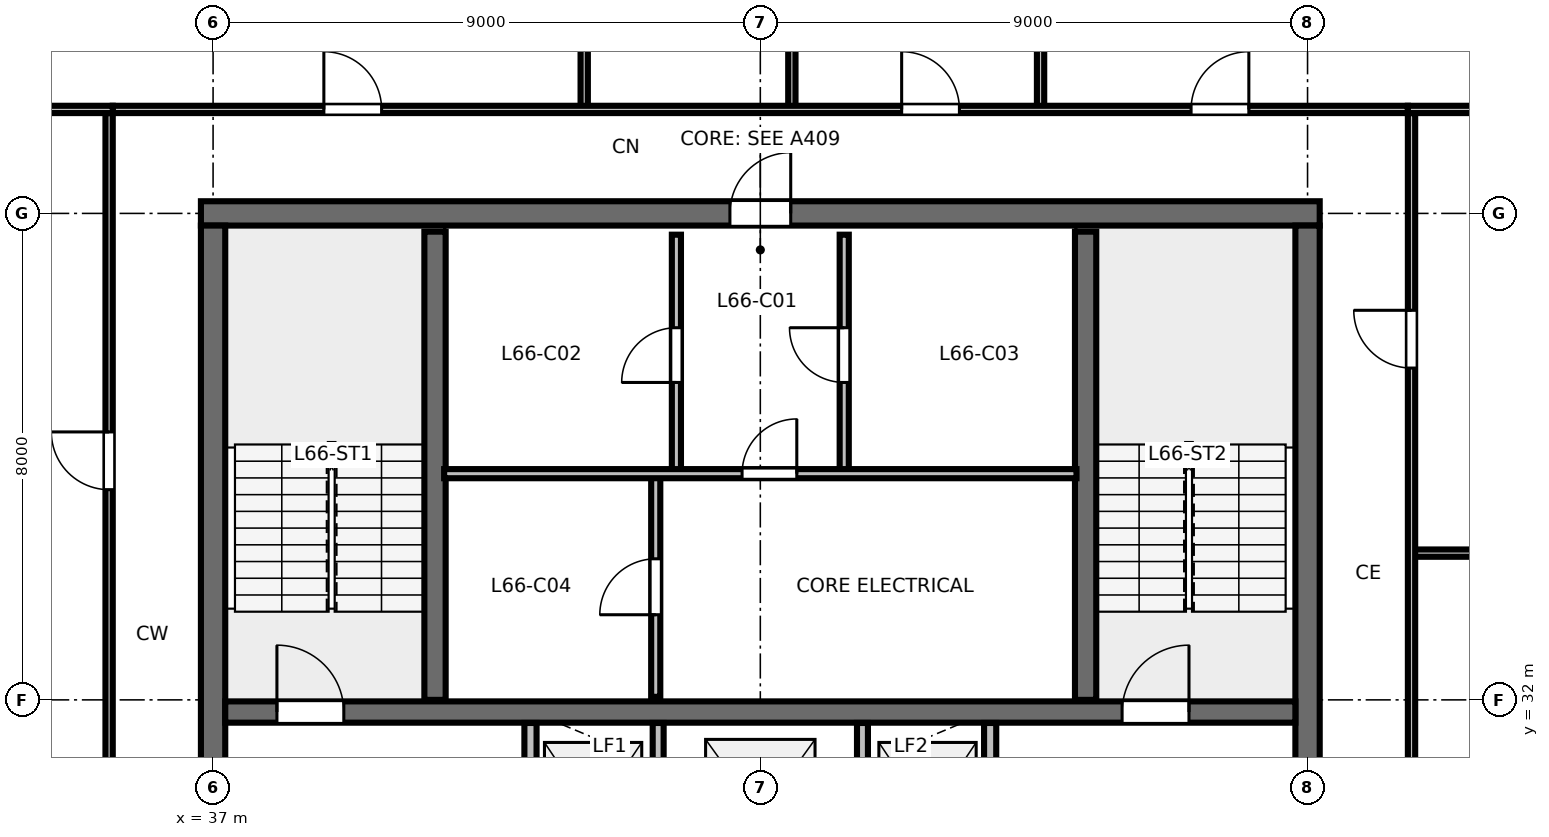
"""IFC4 building model, lengths in metres.
Left out: names, types, materials, properties, quantities, classifications, styles, units other than length and angle.
Written with IfcOpenShell. Run it as: python <this file> out.ifc"""

import sys

from ifc_helpers import new_model, si_unit, direction, frame, frame_2d, origin, place, context, subcontext, project, spatial, rectangle, extrude, element, fill, save


model = new_model("IFC4")
c1 = context("Model", 3, precision=1e-05, world=origin(), true_north=direction((0.0, 1.0)))
c2 = subcontext(c1, "Body", "Model", "MODEL_VIEW")
j1 = project(units=[si_unit("LENGTHUNIT", "METRE"), si_unit("PLANEANGLEUNIT", "RADIAN")], contexts=[c1])
p1 = place(None, origin())
s1 = spatial("IfcSite", under=j1, at=p1, CompositionType="ELEMENT")
p2 = place(p1, origin())
s2 = spatial("IfcBuilding", under=s1, at=p2, CompositionType="ELEMENT")
p3 = place(p2, frame((0.0, 0.0, 250.2)))
s3 = spatial("IfcBuildingStorey", under=s2, at=p3, CompositionType="ELEMENT", Elevation=250.2)
p4 = place(p3, frame((36.8, 40.0, 0.0), z_axis=(0.0, 0.0, 1.0), x_axis=(1.0, 0.0, 0.0)))
e1 = element("IfcWall", 1, at=p4, inside=s3, PredefinedType="SHEAR", context=c2, shape_type="SweptSolid", body=[
    extrude(rectangle(XDim=18.4, YDim=0.4, at=frame_2d((9.2, 0.0))), origin(), (0.0, 0.0, 1.0), 3.36),
])
p5 = place(p4, frame((8.7, 0.0, 0.0)))
e2 = element("IfcOpeningElement", 2, at=p5, cuts=e1, PredefinedType="OPENING", context=c2, shape_type="SweptSolid", body=[
    extrude(rectangle(XDim=1.0, YDim=2.15, at=frame_2d((0.5, 1.075))), frame((0.0, 0.21, 0.0), z_axis=(0.0, -1.0, 0.0), x_axis=(1.0, 0.0, 0.0)), (0.0, 0.0, 1.0), 0.42),
])
p6 = place(p3, frame((37.0, 24.2, 0.0), z_axis=(0.0, 0.0, 1.0), x_axis=(0.0, 1.0, 0.0)))
e3 = element("IfcWall", 3, at=p6, inside=s3, PredefinedType="SHEAR", context=c2, shape_type="SweptSolid", body=[
    extrude(rectangle(XDim=15.6, YDim=0.4, at=frame_2d((7.8, 0.0))), origin(), (0.0, 0.0, 1.0), 3.36),
])
p7 = place(p6, frame((5.325, 0.0, 0.0)))
e4 = element("IfcOpeningElement", 4, at=p7, cuts=e3, PredefinedType="OPENING", context=c2, shape_type="SweptSolid", body=[
    extrude(rectangle(XDim=1.15, YDim=2.15, at=frame_2d((0.575, 1.075))), frame((0.0, 0.21, 0.0), z_axis=(0.0, -1.0, 0.0), x_axis=(1.0, 0.0, 0.0)), (0.0, 0.0, 1.0), 0.42),
])
p8 = place(p3, frame((55.0, 24.2, 0.0), z_axis=(0.0, 0.0, 1.0), x_axis=(0.0, 1.0, 0.0)))
e5 = element("IfcWall", 5, at=p8, inside=s3, PredefinedType="SHEAR", context=c2, shape_type="SweptSolid", body=[
    extrude(rectangle(XDim=15.6, YDim=0.4, at=frame_2d((7.8, 0.0))), origin(), (0.0, 0.0, 1.0), 3.36),
])
p9 = place(p8, frame((5.325, 0.0, 0.0)))
e6 = element("IfcOpeningElement", 6, at=p9, cuts=e5, PredefinedType="OPENING", context=c2, shape_type="SweptSolid", body=[
    extrude(rectangle(XDim=1.15, YDim=2.15, at=frame_2d((0.575, 1.075))), frame((0.0, 0.21, 0.0), z_axis=(0.0, -1.0, 0.0), x_axis=(1.0, 0.0, 0.0)), (0.0, 0.0, 1.0), 0.42),
])
p10 = place(p3, frame((37.2, 31.8, 0.0), z_axis=(0.0, 0.0, 1.0), x_axis=(1.0, 0.0, 0.0)))
e7 = element("IfcWall", 7, at=p10, inside=s3, PredefinedType="SHEAR", context=c2, shape_type="SweptSolid", body=[
    extrude(rectangle(XDim=17.6, YDim=0.35, at=frame_2d((8.8, 0.0))), origin(), (0.0, 0.0, 1.0), 3.36),
])
p11 = place(p10, frame((0.85, 0.0, 0.0)))
e8 = element("IfcOpeningElement", 8, at=p11, cuts=e7, PredefinedType="OPENING", context=c2, shape_type="SweptSolid", body=[
    extrude(rectangle(XDim=1.1, YDim=2.15, at=frame_2d((0.55, 1.075))), frame((0.0, 0.185, 0.0), z_axis=(0.0, -1.0, 0.0), x_axis=(1.0, 0.0, 0.0)), (0.0, 0.0, 1.0), 0.37),
])
p12 = place(p10, frame((14.75, 0.0, 0.0)))
e9 = element("IfcOpeningElement", 9, at=p12, cuts=e7, PredefinedType="OPENING", context=c2, shape_type="SweptSolid", body=[
    extrude(rectangle(XDim=1.1, YDim=2.15, at=frame_2d((0.55, 1.075))), frame((0.0, 0.185, 0.0), z_axis=(0.0, -1.0, 0.0), x_axis=(1.0, 0.0, 0.0)), (0.0, 0.0, 1.0), 0.37),
])
for number, where, z_axis, x_axis in (
    (10, (64.841, 41.62, 0.0), (0.0, 0.0, 1.0), (-0.707, 0.707, 0.0)),
    (11, (34.807, 49.269, 0.0), (0.0, 0.0, 1.0), (-0.707, -0.707, 0.0)),
):
    element("IfcWall", number, at=place(p3, frame(where, z_axis=z_axis, x_axis=x_axis)), inside=s3, PredefinedType="STANDARD", context=c2, shape_type="SweptSolid", body=[
        extrude(rectangle(XDim=10.816, YDim=0.265, at=frame_2d((5.408, 0.0))), origin(), (0.0, 0.0, 1.0), 2.832),
    ])
for number, where, z_axis, x_axis in (
    (12, (40.65, 32.0, 0.0), (0.0, 0.0, 1.0), (0.0, 1.0, 0.0)),
    (13, (51.35, 32.0, 0.0), (0.0, 0.0, 1.0), (0.0, 1.0, 0.0)),
):
    element("IfcWall", number, at=place(p3, frame(where, z_axis=z_axis, x_axis=x_axis)), inside=s3, PredefinedType="SHEAR", context=c2, shape_type="SweptSolid", body=[
        extrude(rectangle(XDim=7.7, YDim=0.35, at=frame_2d((3.85, 0.0))), origin(), (0.0, 0.0, 1.0), 3.6),
    ])
p13 = place(p3, frame((44.62, 35.72, 0.0), z_axis=(0.0, 0.0, 1.0), x_axis=(0.0, 1.0, 0.0)))
e14 = element("IfcWall", 14, at=p13, inside=s3, PredefinedType="PARTITIONING", context=c2, shape_type="SweptSolid", body=[
    extrude(rectangle(XDim=3.93, YDim=0.15, at=frame_2d((1.965, 0.0))), origin(), (0.0, 0.0, 1.0), 3.375),
])
p14 = place(p13, frame((1.5, 0.0, 0.0)))
e15 = element("IfcOpeningElement", 15, at=p14, cuts=e14, PredefinedType="OPENING", context=c2, shape_type="SweptSolid", body=[
    extrude(rectangle(XDim=0.9, YDim=2.15, at=frame_2d((0.45, 1.075))), frame((0.0, 0.085, 0.0), z_axis=(0.0, -1.0, 0.0), x_axis=(1.0, 0.0, 0.0)), (0.0, 0.0, 1.0), 0.17),
])
p15 = place(p3, frame((47.38, 35.72, 0.0), z_axis=(0.0, 0.0, 1.0), x_axis=(0.0, 1.0, 0.0)))
e16 = element("IfcWall", 16, at=p15, inside=s3, PredefinedType="PARTITIONING", context=c2, shape_type="SweptSolid", body=[
    extrude(rectangle(XDim=3.93, YDim=0.15, at=frame_2d((1.965, 0.0))), origin(), (0.0, 0.0, 1.0), 3.375),
])
p16 = place(p15, frame((1.5, 0.0, 0.0)))
e17 = element("IfcOpeningElement", 17, at=p16, cuts=e16, PredefinedType="OPENING", context=c2, shape_type="SweptSolid", body=[
    extrude(rectangle(XDim=0.9, YDim=2.15, at=frame_2d((0.45, 1.075))), frame((0.0, 0.085, 0.0), z_axis=(0.0, -1.0, 0.0), x_axis=(1.0, 0.0, 0.0)), (0.0, 0.0, 1.0), 0.17),
])
p17 = place(p3, frame((44.28, 32.05, 0.0), z_axis=(0.0, 0.0, 1.0), x_axis=(0.0, 1.0, 0.0)))
e18 = element("IfcWall", 18, at=p17, inside=s3, PredefinedType="PARTITIONING", context=c2, shape_type="SweptSolid", body=[
    extrude(rectangle(XDim=3.67, YDim=0.15, at=frame_2d((1.835, 0.0))), origin(), (0.0, 0.0, 1.0), 3.375),
])
p18 = place(p17, frame((1.35, 0.0, 0.0)))
e19 = element("IfcOpeningElement", 19, at=p18, cuts=e18, PredefinedType="OPENING", context=c2, shape_type="SweptSolid", body=[
    extrude(rectangle(XDim=0.92, YDim=2.15, at=frame_2d((0.46, 1.075))), frame((0.0, 0.085, 0.0), z_axis=(0.0, -1.0, 0.0), x_axis=(1.0, 0.0, 0.0)), (0.0, 0.0, 1.0), 0.17),
])
p19 = place(p3, frame((40.8, 35.72, 0.0), z_axis=(0.0, 0.0, 1.0), x_axis=(1.0, 0.0, 0.0)))
e20 = element("IfcWall", 20, at=p19, inside=s3, PredefinedType="PARTITIONING", context=c2, shape_type="SweptSolid", body=[
    extrude(rectangle(XDim=10.4, YDim=0.15, at=frame_2d((5.2, 0.0))), origin(), (0.0, 0.0, 1.0), 3.375),
])
p20 = place(p19, frame((4.9, 0.0, 0.0)))
e21 = element("IfcOpeningElement", 21, at=p20, cuts=e20, PredefinedType="OPENING", context=c2, shape_type="SweptSolid", body=[
    extrude(rectangle(XDim=0.9, YDim=2.15, at=frame_2d((0.45, 1.075))), frame((0.0, 0.085, 0.0), z_axis=(0.0, -1.0, 0.0), x_axis=(1.0, 0.0, 0.0)), (0.0, 0.0, 1.0), 0.17),
])
p21 = place(p3, frame((42.22, 28.58, 0.0), z_axis=(0.0, 0.0, 1.0), x_axis=(0.0, 1.0, 0.0)))
e22 = element("IfcWall", 22, at=p21, inside=s3, PredefinedType="PARTITIONING", context=c2, shape_type="SweptSolid", body=[
    extrude(rectangle(XDim=3.04, YDim=0.2, at=frame_2d((1.52, 0.0))), origin(), (0.0, 0.0, 1.0), 3.375),
])
p22 = place(p21, frame((0.95, 0.0, 0.0)))
e23 = element("IfcOpeningElement", 23, at=p22, cuts=e22, PredefinedType="OPENING", context=c2, shape_type="SweptSolid", body=[
    extrude(rectangle(XDim=1.05, YDim=2.15, at=frame_2d((0.525, 1.075))), frame((0.0, 0.11, 0.0), z_axis=(0.0, -1.0, 0.0), x_axis=(1.0, 0.0, 0.0)), (0.0, 0.0, 1.0), 0.22),
])
p23 = place(p3, frame((49.78, 28.58, 0.0), z_axis=(0.0, 0.0, 1.0), x_axis=(0.0, 1.0, 0.0)))
e24 = element("IfcWall", 24, at=p23, inside=s3, PredefinedType="PARTITIONING", context=c2, shape_type="SweptSolid", body=[
    extrude(rectangle(XDim=3.04, YDim=0.2, at=frame_2d((1.52, 0.0))), origin(), (0.0, 0.0, 1.0), 3.375),
])
p24 = place(p23, frame((0.95, 0.0, 0.0)))
e25 = element("IfcOpeningElement", 25, at=p24, cuts=e24, PredefinedType="OPENING", context=c2, shape_type="SweptSolid", body=[
    extrude(rectangle(XDim=1.05, YDim=2.15, at=frame_2d((0.525, 1.075))), frame((0.0, 0.11, 0.0), z_axis=(0.0, -1.0, 0.0), x_axis=(1.0, 0.0, 0.0)), (0.0, 0.0, 1.0), 0.22),
])
for number, where, z_axis, x_axis in (
    (26, (44.32, 28.58, 0.0), (0.0, 0.0, 1.0), (0.0, 1.0, 0.0)),
    (27, (47.68, 28.58, 0.0), (0.0, 0.0, 1.0), (0.0, 1.0, 0.0)),
):
    element("IfcWall", number, at=place(p3, frame(where, z_axis=z_axis, x_axis=x_axis)), inside=s3, PredefinedType="PARTITIONING", context=c2, shape_type="SweptSolid", body=[
        extrude(rectangle(XDim=3.04, YDim=0.18, at=frame_2d((1.52, 0.0))), origin(), (0.0, 0.0, 1.0), 3.375),
    ])
p25 = place(p3, frame((43.104, 41.71, 0.0), z_axis=(0.0, 0.0, 1.0), x_axis=(0.0, 1.0, 0.0)))
e28 = element("IfcWall", 28, at=p25, inside=s3, PredefinedType="PARTITIONING", context=c2, shape_type="SweptSolid", body=[
    extrude(rectangle(XDim=7.114, YDim=0.12, at=frame_2d((3.557, 0.0))), origin(), (0.0, 0.0, 1.0), 2.655),
])
p26 = place(p25, frame((1.4, 0.0, 0.0)))
e29 = element("IfcOpeningElement", 29, at=p26, cuts=e28, PredefinedType="OPENING", context=c2, shape_type="SweptSolid", body=[
    extrude(rectangle(XDim=0.9, YDim=2.15, at=frame_2d((0.45, 1.075))), frame((0.0, 0.07, 0.0), z_axis=(0.0, -1.0, 0.0), x_axis=(1.0, 0.0, 0.0)), (0.0, 0.0, 1.0), 0.14),
])
p27 = place(p3, frame((46.519, 41.71, 0.0), z_axis=(0.0, 0.0, 1.0), x_axis=(0.0, 1.0, 0.0)))
e30 = element("IfcWall", 30, at=p27, inside=s3, PredefinedType="PARTITIONING", context=c2, shape_type="SweptSolid", body=[
    extrude(rectangle(XDim=7.114, YDim=0.12, at=frame_2d((3.557, 0.0))), origin(), (0.0, 0.0, 1.0), 2.655),
])
p28 = place(p27, frame((1.4, 0.0, 0.0)))
e31 = element("IfcOpeningElement", 31, at=p28, cuts=e30, PredefinedType="OPENING", context=c2, shape_type="SweptSolid", body=[
    extrude(rectangle(XDim=0.9, YDim=2.15, at=frame_2d((0.45, 1.075))), frame((0.0, 0.07, 0.0), z_axis=(0.0, -1.0, 0.0), x_axis=(1.0, 0.0, 0.0)), (0.0, 0.0, 1.0), 0.14),
])
p29 = place(p3, frame((50.609, 41.71, 0.0), z_axis=(0.0, 0.0, 1.0), x_axis=(0.0, 1.0, 0.0)))
e32 = element("IfcWall", 32, at=p29, inside=s3, PredefinedType="PARTITIONING", context=c2, shape_type="SweptSolid", body=[
    extrude(rectangle(XDim=7.114, YDim=0.12, at=frame_2d((3.557, 0.0))), origin(), (0.0, 0.0, 1.0), 2.655),
])
p30 = place(p29, frame((1.4, 0.0, 0.0)))
e33 = element("IfcOpeningElement", 33, at=p30, cuts=e32, PredefinedType="OPENING", context=c2, shape_type="SweptSolid", body=[
    extrude(rectangle(XDim=0.9, YDim=2.15, at=frame_2d((0.45, 1.075))), frame((0.0, 0.07, 0.0), z_axis=(0.0, -1.0, 0.0), x_axis=(1.0, 0.0, 0.0)), (0.0, 0.0, 1.0), 0.14),
])
p31 = place(p3, frame((35.35, 41.71, 0.0), z_axis=(0.0, 0.0, 1.0), x_axis=(1.0, 0.0, 0.0)))
e34 = element("IfcWall", 34, at=p31, inside=s3, PredefinedType="PARTITIONING", context=c2, shape_type="SweptSolid", body=[
    extrude(rectangle(XDim=21.3, YDim=0.12, at=frame_2d((10.65, 0.0))), origin(), (0.0, 0.0, 1.0), 2.655),
])
p32 = place(p31, frame((3.472, 0.0, 0.0)))
e35 = element("IfcOpeningElement", 35, at=p32, cuts=e34, PredefinedType="OPENING", context=c2, shape_type="SweptSolid", body=[
    extrude(rectangle(XDim=0.95, YDim=2.15, at=frame_2d((0.475, 1.075))), frame((0.0, 0.07, 0.0), z_axis=(0.0, -1.0, 0.0), x_axis=(1.0, 0.0, 0.0)), (0.0, 0.0, 1.0), 0.14),
])
p33 = place(p31, frame((12.975, 0.0, 0.0)))
e36 = element("IfcOpeningElement", 36, at=p33, cuts=e34, PredefinedType="OPENING", context=c2, shape_type="SweptSolid", body=[
    extrude(rectangle(XDim=0.95, YDim=2.15, at=frame_2d((0.475, 1.075))), frame((0.0, 0.07, 0.0), z_axis=(0.0, -1.0, 0.0), x_axis=(1.0, 0.0, 0.0)), (0.0, 0.0, 1.0), 0.14),
])
p34 = place(p31, frame((17.735, 0.0, 0.0)))
e37 = element("IfcOpeningElement", 37, at=p34, cuts=e34, PredefinedType="OPENING", context=c2, shape_type="SweptSolid", body=[
    extrude(rectangle(XDim=0.95, YDim=2.15, at=frame_2d((0.475, 1.075))), frame((0.0, 0.07, 0.0), z_axis=(0.0, -1.0, 0.0), x_axis=(1.0, 0.0, 0.0)), (0.0, 0.0, 1.0), 0.14),
])
p35 = place(p3, frame((35.29, 22.35, 0.0), z_axis=(0.0, 0.0, 1.0), x_axis=(0.0, 1.0, 0.0)))
e38 = element("IfcWall", 38, at=p35, inside=s3, PredefinedType="PARTITIONING", context=c2, shape_type="SweptSolid", body=[
    extrude(rectangle(XDim=19.3, YDim=0.12, at=frame_2d((9.65, 0.0))), origin(), (0.0, 0.0, 1.0), 2.655),
])
p36 = place(p35, frame((3.656, 0.0, 0.0)))
e39 = element("IfcOpeningElement", 39, at=p36, cuts=e38, PredefinedType="OPENING", context=c2, shape_type="SweptSolid", body=[
    extrude(rectangle(XDim=0.95, YDim=2.15, at=frame_2d((0.475, 1.075))), frame((0.0, 0.07, 0.0), z_axis=(0.0, -1.0, 0.0), x_axis=(1.0, 0.0, 0.0)), (0.0, 0.0, 1.0), 0.14),
])
p37 = place(p35, frame((13.106, 0.0, 0.0)))
e40 = element("IfcOpeningElement", 40, at=p37, cuts=e38, PredefinedType="OPENING", context=c2, shape_type="SweptSolid", body=[
    extrude(rectangle(XDim=0.95, YDim=2.15, at=frame_2d((0.475, 1.075))), frame((0.0, 0.07, 0.0), z_axis=(0.0, -1.0, 0.0), x_axis=(1.0, 0.0, 0.0)), (0.0, 0.0, 1.0), 0.14),
])
p38 = place(p3, frame((56.71, 34.413, 0.0), z_axis=(0.0, 0.0, 1.0), x_axis=(1.0, 0.0, 0.0)))
e41 = element("IfcWall", 41, at=p38, inside=s3, PredefinedType="PARTITIONING", context=c2, shape_type="SweptSolid", body=[
    extrude(rectangle(XDim=7.687, YDim=0.12, at=frame_2d((3.843, 0.0))), origin(), (0.0, 0.0, 1.0), 2.655),
])
p39 = place(p38, frame((1.4, 0.0, 0.0)))
e42 = element("IfcOpeningElement", 42, at=p39, cuts=e41, PredefinedType="OPENING", context=c2, shape_type="SweptSolid", body=[
    extrude(rectangle(XDim=0.9, YDim=2.15, at=frame_2d((0.45, 1.075))), frame((0.0, 0.07, 0.0), z_axis=(0.0, -1.0, 0.0), x_axis=(1.0, 0.0, 0.0)), (0.0, 0.0, 1.0), 0.14),
])
p40 = place(p3, frame((56.71, 22.35, 0.0), z_axis=(0.0, 0.0, 1.0), x_axis=(0.0, 1.0, 0.0)))
e43 = element("IfcWall", 43, at=p40, inside=s3, PredefinedType="PARTITIONING", context=c2, shape_type="SweptSolid", body=[
    extrude(rectangle(XDim=19.3, YDim=0.12, at=frame_2d((9.65, 0.0))), origin(), (0.0, 0.0, 1.0), 2.655),
])
p41 = place(p40, frame((5.657, 0.0, 0.0)))
e44 = element("IfcOpeningElement", 44, at=p41, cuts=e43, PredefinedType="OPENING", context=c2, shape_type="SweptSolid", body=[
    extrude(rectangle(XDim=0.95, YDim=2.15, at=frame_2d((0.475, 1.075))), frame((0.0, 0.07, 0.0), z_axis=(0.0, -1.0, 0.0), x_axis=(1.0, 0.0, 0.0)), (0.0, 0.0, 1.0), 0.14),
])
p42 = place(p40, frame((15.107, 0.0, 0.0)))
e45 = element("IfcOpeningElement", 45, at=p42, cuts=e43, PredefinedType="OPENING", context=c2, shape_type="SweptSolid", body=[
    extrude(rectangle(XDim=0.95, YDim=2.15, at=frame_2d((0.475, 1.075))), frame((0.0, 0.07, 0.0), z_axis=(0.0, -1.0, 0.0), x_axis=(1.0, 0.0, 0.0)), (0.0, 0.0, 1.0), 0.14),
])
for number, where, z_axis, x_axis in (
    (46, (35.35, 41.71, 0.0), (0.0, 0.0, 1.0), (-1.0, 0.0, 0.0)),
    (47, (56.65, 41.71, 0.0), (0.0, 0.0, 1.0), (1.0, 0.0, 0.0)),
):
    element("IfcWall", number, at=place(p3, frame(where, z_axis=z_axis, x_axis=x_axis)), inside=s3, PredefinedType="PARTITIONING", context=c2, shape_type="SweptSolid", body=[
        extrude(rectangle(XDim=7.747, YDim=0.12, at=frame_2d((3.873, 0.0))), origin(), (0.0, 0.0, 1.0), 2.655),
    ])
p43 = place(p11, origin())
e48 = element("IfcDoor", 48, at=p43, inside=s3, OperationType="SINGLE_SWING_LEFT", PredefinedType="DOOR", context=c2, shape_type="SweptSolid", body=[
    extrude(rectangle(XDim=1.1, YDim=2.15, at=frame_2d((0.55, 1.075))), frame((0.0, 0.025, 0.0), z_axis=(0.0, -1.0, 0.0), x_axis=(1.0, 0.0, 0.0)), (0.0, 0.0, 1.0), 0.05),
])
fill(e8, e48)
p44 = place(p12, origin())
e49 = element("IfcDoor", 49, at=p44, inside=s3, OperationType="SINGLE_SWING_RIGHT", PredefinedType="DOOR", context=c2, shape_type="SweptSolid", body=[
    extrude(rectangle(XDim=1.1, YDim=2.15, at=frame_2d((0.55, 1.075))), frame((0.0, 0.025, 0.0), z_axis=(0.0, -1.0, 0.0), x_axis=(1.0, 0.0, 0.0)), (0.0, 0.0, 1.0), 0.05),
])
fill(e9, e49)
p45 = place(p5, origin())
e50 = element("IfcDoor", 50, at=p45, inside=s3, OperationType="SINGLE_SWING_RIGHT", PredefinedType="DOOR", context=c2, shape_type="SweptSolid", body=[
    extrude(rectangle(XDim=1.0, YDim=2.15, at=frame_2d((0.5, 1.075))), frame((0.0, 0.025, 0.0), z_axis=(0.0, -1.0, 0.0), x_axis=(1.0, 0.0, 0.0)), (0.0, 0.0, 1.0), 0.05),
])
fill(e2, e50)
p46 = place(p14, origin())
e51 = element("IfcDoor", 51, at=p46, inside=s3, OperationType="SINGLE_SWING_LEFT", PredefinedType="DOOR", context=c2, shape_type="SweptSolid", body=[
    extrude(rectangle(XDim=0.9, YDim=2.15, at=frame_2d((0.45, 1.075))), frame((0.0, 0.025, 0.0), z_axis=(0.0, -1.0, 0.0), x_axis=(1.0, 0.0, 0.0)), (0.0, 0.0, 1.0), 0.05),
])
fill(e15, e51)
p47 = place(p16, origin())
e52 = element("IfcDoor", 52, at=p47, inside=s3, OperationType="SINGLE_SWING_RIGHT", PredefinedType="DOOR", context=c2, shape_type="SweptSolid", body=[
    extrude(rectangle(XDim=0.9, YDim=2.15, at=frame_2d((0.45, 1.075))), frame((0.0, 0.025, 0.0), z_axis=(0.0, -1.0, 0.0), x_axis=(1.0, 0.0, 0.0)), (0.0, 0.0, 1.0), 0.05),
])
fill(e17, e52)
p48 = place(p18, origin())
e53 = element("IfcDoor", 53, at=p48, inside=s3, OperationType="SINGLE_SWING_LEFT", PredefinedType="DOOR", context=c2, shape_type="SweptSolid", body=[
    extrude(rectangle(XDim=0.92, YDim=2.15, at=frame_2d((0.46, 1.075))), frame((0.0, 0.025, 0.0), z_axis=(0.0, -1.0, 0.0), x_axis=(1.0, 0.0, 0.0)), (0.0, 0.0, 1.0), 0.05),
])
fill(e19, e53)
p49 = place(p20, origin())
e54 = element("IfcDoor", 54, at=p49, inside=s3, OperationType="SINGLE_SWING_RIGHT", PredefinedType="DOOR", context=c2, shape_type="SweptSolid", body=[
    extrude(rectangle(XDim=0.9, YDim=2.15, at=frame_2d((0.45, 1.075))), frame((0.0, 0.025, 0.0), z_axis=(0.0, -1.0, 0.0), x_axis=(1.0, 0.0, 0.0)), (0.0, 0.0, 1.0), 0.05),
])
fill(e21, e54)
p50 = place(p32, origin())
e55 = element("IfcDoor", 55, at=p50, inside=s3, OperationType="SINGLE_SWING_LEFT", PredefinedType="DOOR", context=c2, shape_type="SweptSolid", body=[
    extrude(rectangle(XDim=0.95, YDim=2.15, at=frame_2d((0.475, 1.075))), frame((0.0, 0.025, 0.0), z_axis=(0.0, -1.0, 0.0), x_axis=(1.0, 0.0, 0.0)), (0.0, 0.0, 1.0), 0.05),
])
fill(e35, e55)
p51 = place(p33, origin())
e56 = element("IfcDoor", 56, at=p51, inside=s3, OperationType="SINGLE_SWING_LEFT", PredefinedType="DOOR", context=c2, shape_type="SweptSolid", body=[
    extrude(rectangle(XDim=0.95, YDim=2.15, at=frame_2d((0.475, 1.075))), frame((0.0, 0.025, 0.0), z_axis=(0.0, -1.0, 0.0), x_axis=(1.0, 0.0, 0.0)), (0.0, 0.0, 1.0), 0.05),
])
fill(e36, e56)
p52 = place(p34, origin())
e57 = element("IfcDoor", 57, at=p52, inside=s3, OperationType="SINGLE_SWING_RIGHT", PredefinedType="DOOR", context=c2, shape_type="SweptSolid", body=[
    extrude(rectangle(XDim=0.95, YDim=2.15, at=frame_2d((0.475, 1.075))), frame((0.0, 0.025, 0.0), z_axis=(0.0, -1.0, 0.0), x_axis=(1.0, 0.0, 0.0)), (0.0, 0.0, 1.0), 0.05),
])
fill(e37, e57)
p53 = place(p37, origin())
e58 = element("IfcDoor", 58, at=p53, inside=s3, OperationType="SINGLE_SWING_RIGHT", PredefinedType="DOOR", context=c2, shape_type="SweptSolid", body=[
    extrude(rectangle(XDim=0.95, YDim=2.15, at=frame_2d((0.475, 1.075))), frame((0.0, 0.025, 0.0), z_axis=(0.0, -1.0, 0.0), x_axis=(1.0, 0.0, 0.0)), (0.0, 0.0, 1.0), 0.05),
])
fill(e40, e58)
p54 = place(p42, origin())
e59 = element("IfcDoor", 59, at=p54, inside=s3, OperationType="SINGLE_SWING_RIGHT", PredefinedType="DOOR", context=c2, shape_type="SweptSolid", body=[
    extrude(rectangle(XDim=0.95, YDim=2.15, at=frame_2d((0.475, 1.075))), frame((0.0, 0.025, 0.0), z_axis=(0.0, -1.0, 0.0), x_axis=(1.0, 0.0, 0.0)), (0.0, 0.0, 1.0), 0.05),
])
fill(e45, e59)
save(model, sys.argv[1])
